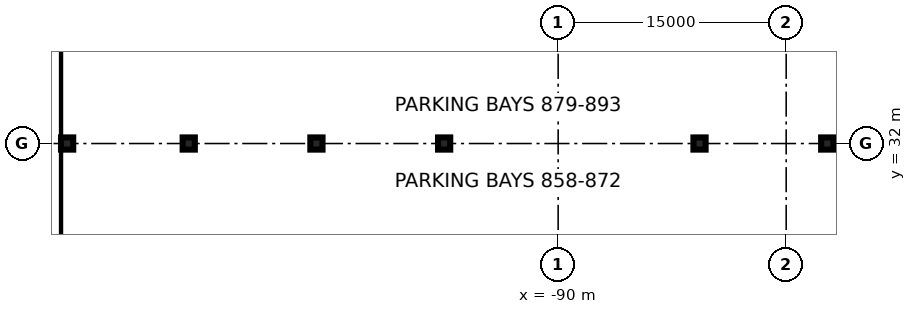
"""IFC4 building model, lengths in metres.
Left out: names, types, materials, properties, quantities, classifications, styles, units other than length and angle.
Written with IfcOpenShell. Run it as: python <this file> out.ifc"""

import sys

from ifc_helpers import new_model, si_unit, direction, frame, frame_2d, origin, origin_2d, place, context, subcontext, project, spatial, rectangle, extrude, element, save


model = new_model("IFC4")
c1 = context("Model", 3, precision=1e-05, world=origin(), true_north=direction((0.0, 1.0)))
c2 = subcontext(c1, "Body", "Model", "MODEL_VIEW")
j1 = project(units=[si_unit("LENGTHUNIT", "METRE"), si_unit("PLANEANGLEUNIT", "RADIAN")], contexts=[c1])
p1 = place(None, origin())
s1 = spatial("IfcSite", under=j1, at=p1, CompositionType="ELEMENT")
p2 = place(p1, origin())
s2 = spatial("IfcBuilding", under=s1, at=p2, CompositionType="ELEMENT")
p3 = place(p2, frame((0.0, 0.0, -12.0)))
s3 = spatial("IfcBuildingStorey", under=s2, at=p3, CompositionType="ELEMENT", Elevation=-12.0)
p4 = place(p3, frame((-123.15, -80.0, 0.0), z_axis=(0.0, 0.0, 1.0), x_axis=(0.0, 1.0, 0.0)))
e1 = element("IfcWall", 1, at=p4, inside=s3, PredefinedType="USERDEFINED", context=c2, shape_type="SweptSolid", body=[
    extrude(rectangle(XDim=160.0, YDim=0.9, at=frame_2d((80.0, 0.0))), origin(), (0.0, 0.0, 1.0), 11.55),
])
p5 = place(p2, frame((0.0, 0.0, -7.2)))
s4 = spatial("IfcBuildingStorey", under=s2, at=p5, CompositionType="ELEMENT", Elevation=-7.2)
for number, where, z_axis, x_axis in (
    (2, (-122.3, 32.0, -0.4), (0.0, 0.0, 1.0), (1.0, 0.0, 0.0)),
    (3, (-114.3, 32.0, -0.4), (0.0, 0.0, 1.0), (1.0, 0.0, 0.0)),
    (4, (-105.9, 32.0, -0.4), (0.0, 0.0, 1.0), (1.0, 0.0, 0.0)),
    (5, (-97.5, 32.0, -0.4), (0.0, 0.0, 1.0), (1.0, 0.0, 0.0)),
    (6, (-80.7, 32.0, -0.4), (0.0, 0.0, 1.0), (1.0, 0.0, 0.0)),
    (7, (-72.3, 32.0, -0.4), (0.0, 0.0, 1.0), (1.0, 0.0, 0.0)),
):
    element("IfcColumn", number, at=place(p5, frame(where, z_axis=z_axis, x_axis=x_axis)), inside=s4, PredefinedType="COLUMN", context=c2, shape_type="SweptSolid", body=[
        extrude(rectangle(XDim=0.8, YDim=0.8, at=origin_2d()), origin(), (0.0, 0.0, 1.0), 3.6),
    ])
save(model, sys.argv[1])
